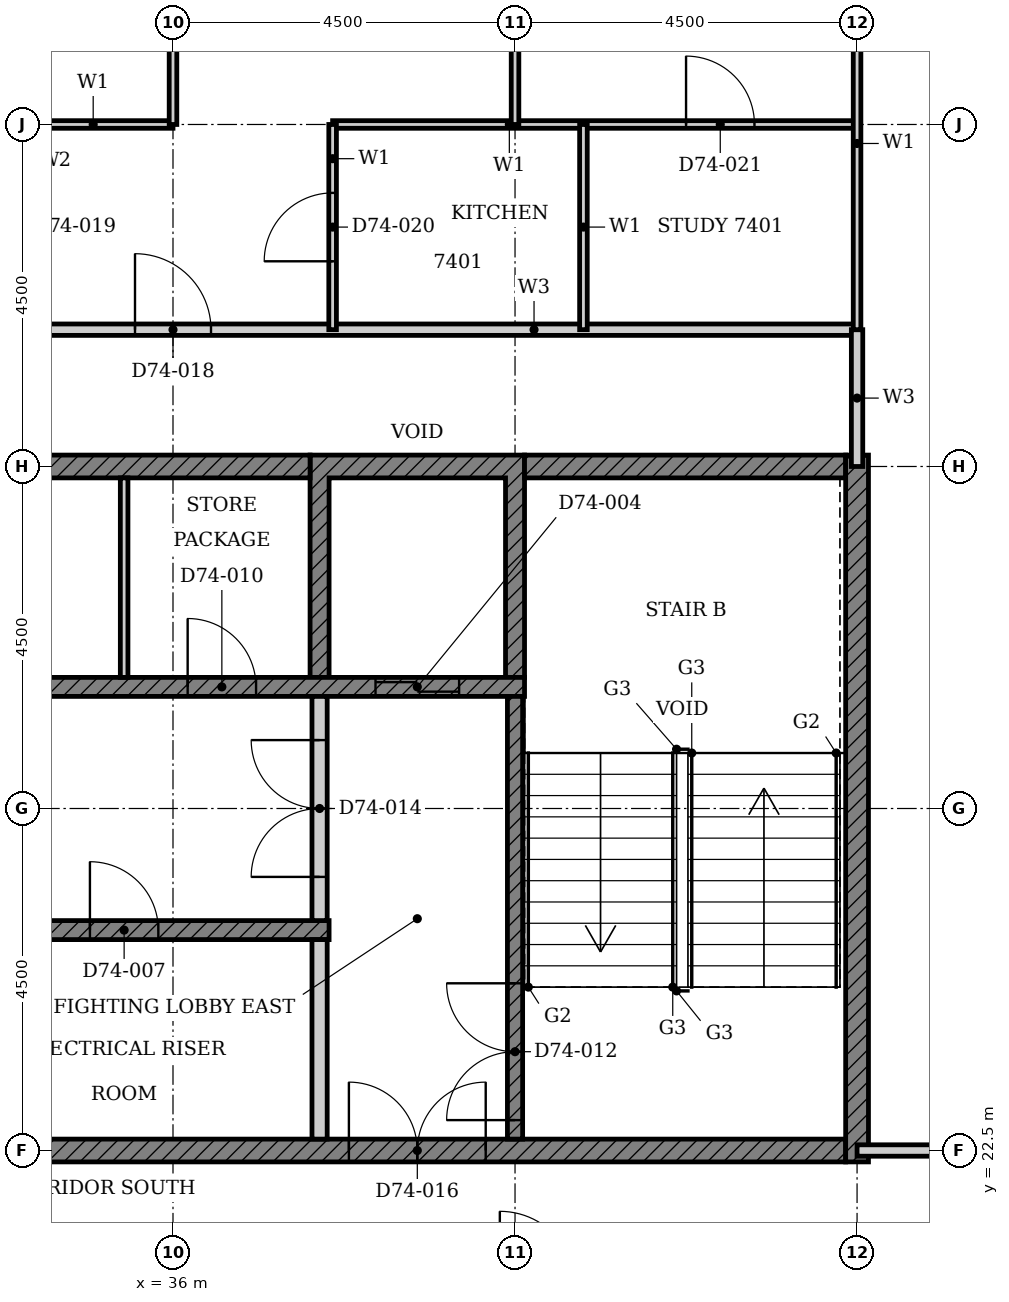
"""IFC4 building model, lengths in metres.
Left out: names, types, materials, properties, quantities, classifications, styles, units other than length and angle.
Written with IfcOpenShell. Run it as: python <this file> out.ifc"""

import sys

from ifc_helpers import new_model, si_unit, direction, frame, frame_2d, origin, place, context, subcontext, project, spatial, polyline, rectangle, outline, extrude, element, fill, save


model = new_model("IFC4")
c1 = context("Model", 3, precision=1e-05, world=origin(), true_north=direction((0.0, 1.0)))
c2 = subcontext(c1, "Body", "Model", "MODEL_VIEW")
j1 = project(units=[si_unit("LENGTHUNIT", "METRE"), si_unit("PLANEANGLEUNIT", "RADIAN")], contexts=[c1])
p1 = place(None, origin())
s1 = spatial("IfcSite", under=j1, at=p1, CompositionType="ELEMENT")
p2 = place(p1, origin())
s2 = spatial("IfcBuilding", under=s1, at=p2, CompositionType="ELEMENT")
p3 = place(p2, frame((0.0, 0.0, 290.8)))
s3 = spatial("IfcBuildingStorey", under=s2, at=p3, CompositionType="ELEMENT", Elevation=290.8)
p4 = place(p3, origin())
e1 = element("IfcWall", 1, at=p4, inside=s3, PredefinedType="SHEAR", context=c2, shape_type="SweptSolid", body=[
    extrude(outline(polyline([(37.803, 28.725), (38.053, 28.725), (38.053, 31.35), (40.375, 31.35), (40.375, 28.725), (40.625, 28.725), (40.625, 31.65), (37.803, 31.65), (37.803, 28.725)])), origin(), (0.0, 0.0, 1.0), 3.4),
])
p5 = place(p3, frame((30.339, 22.5, 0.0), z_axis=(0.0, 0.0, 1.0), x_axis=(1.0, 0.0, 0.0)))
e2 = element("IfcWall", 2, at=p5, inside=s3, PredefinedType="SHEAR", context=c2, shape_type="SweptSolid", body=[
    extrude(rectangle(XDim=14.511, YDim=0.3, at=frame_2d((7.255, 0.0))), origin(), (0.0, 0.0, 1.0), 3.4),
])
p6 = place(p5, frame((7.975, 0.0, 0.0)))
e3 = element("IfcOpeningElement", 3, at=p6, cuts=e2, PredefinedType="OPENING", context=c2, shape_type="SweptSolid", body=[
    extrude(rectangle(XDim=1.8, YDim=2.1, at=frame_2d((0.9, 1.05))), frame((0.0, 0.16, 0.0), z_axis=(0.0, -1.0, 0.0), x_axis=(1.0, 0.0, 0.0)), (0.0, 0.0, 1.0), 0.32),
])
p7 = place(p3, frame((30.339, 31.5, 0.0), z_axis=(0.0, 0.0, 1.0), x_axis=(1.0, 0.0, 0.0)))
e4 = element("IfcWall", 4, at=p7, inside=s3, PredefinedType="SHEAR", context=c2, shape_type="SweptSolid", body=[
    extrude(rectangle(XDim=7.464, YDim=0.3, at=frame_2d((3.732, 0.0))), origin(), (0.0, 0.0, 1.0), 3.4),
])
p8 = place(p3, frame((40.625, 31.5, 0.0), z_axis=(0.0, 0.0, 1.0), x_axis=(1.0, 0.0, 0.0)))
e5 = element("IfcWall", 5, at=p8, inside=s3, PredefinedType="SHEAR", context=c2, shape_type="SweptSolid", body=[
    extrude(rectangle(XDim=4.225, YDim=0.3, at=frame_2d((2.113, 0.0))), origin(), (0.0, 0.0, 1.0), 3.4),
])
p9 = place(p3, frame((45.0, 22.35, 0.0), z_axis=(0.0, 0.0, 1.0), x_axis=(0.0, 1.0, 0.0)))
e6 = element("IfcWall", 6, at=p9, inside=s3, PredefinedType="SHEAR", context=c2, shape_type="SweptSolid", body=[
    extrude(rectangle(XDim=9.3, YDim=0.3, at=frame_2d((4.65, 0.0))), origin(), (0.0, 0.0, 1.0), 3.4),
])
p10 = place(p3, frame((22.375, 25.4, 0.0), z_axis=(0.0, 0.0, 1.0), x_axis=(1.0, 0.0, 0.0)))
e7 = element("IfcWall", 7, at=p10, inside=s3, PredefinedType="SHEAR", context=c2, shape_type="SweptSolid", body=[
    extrude(rectangle(XDim=15.678, YDim=0.25, at=frame_2d((7.839, 0.0))), origin(), (0.0, 0.0, 1.0), 3.4),
])
p11 = place(p10, frame((6.004, 0.0, 0.0)))
e8 = element("IfcOpeningElement", 8, at=p11, cuts=e7, PredefinedType="OPENING", context=c2, shape_type="SweptSolid", body=[
    extrude(rectangle(XDim=1.1, YDim=2.1, at=frame_2d((0.55, 1.05))), frame((0.0, 0.135, 0.0), z_axis=(0.0, -1.0, 0.0), x_axis=(1.0, 0.0, 0.0)), (0.0, 0.0, 1.0), 0.27),
])
p12 = place(p10, frame((0.861, 0.0, 0.0)))
e9 = element("IfcOpeningElement", 9, at=p12, cuts=e7, PredefinedType="OPENING", context=c2, shape_type="SweptSolid", body=[
    extrude(rectangle(XDim=1.1, YDim=2.1, at=frame_2d((0.55, 1.05))), frame((0.0, 0.135, 0.0), z_axis=(0.0, -1.0, 0.0), x_axis=(1.0, 0.0, 0.0)), (0.0, 0.0, 1.0), 0.27),
])
p13 = place(p10, frame((3.532, 0.0, 0.0)))
e10 = element("IfcOpeningElement", 10, at=p13, cuts=e7, PredefinedType="OPENING", context=c2, shape_type="SweptSolid", body=[
    extrude(rectangle(XDim=0.9, YDim=2.1, at=frame_2d((0.45, 1.05))), frame((0.0, 0.135, 0.0), z_axis=(0.0, -1.0, 0.0), x_axis=(1.0, 0.0, 0.0)), (0.0, 0.0, 1.0), 0.27),
])
p14 = place(p10, frame((8.675, 0.0, 0.0)))
e11 = element("IfcOpeningElement", 11, at=p14, cuts=e7, PredefinedType="OPENING", context=c2, shape_type="SweptSolid", body=[
    extrude(rectangle(XDim=0.9, YDim=2.1, at=frame_2d((0.45, 1.05))), frame((0.0, 0.135, 0.0), z_axis=(0.0, -1.0, 0.0), x_axis=(1.0, 0.0, 0.0)), (0.0, 0.0, 1.0), 0.27),
])
p15 = place(p10, frame((12.532, 0.0, 0.0)))
e12 = element("IfcOpeningElement", 12, at=p15, cuts=e7, PredefinedType="OPENING", context=c2, shape_type="SweptSolid", body=[
    extrude(rectangle(XDim=0.9, YDim=2.1, at=frame_2d((0.45, 1.05))), frame((0.0, 0.135, 0.0), z_axis=(0.0, -1.0, 0.0), x_axis=(1.0, 0.0, 0.0)), (0.0, 0.0, 1.0), 0.27),
])
p16 = place(p3, frame((24.947, 28.6, 0.0), z_axis=(0.0, 0.0, 1.0), x_axis=(1.0, 0.0, 0.0)))
e13 = element("IfcWall", 13, at=p16, inside=s3, PredefinedType="SHEAR", context=c2, shape_type="SweptSolid", body=[
    extrude(rectangle(XDim=15.678, YDim=0.25, at=frame_2d((7.839, 0.0))), origin(), (0.0, 0.0, 1.0), 3.4),
])
p17 = place(p16, frame((3.432, 0.0, 0.0)))
e14 = element("IfcOpeningElement", 14, at=p17, cuts=e13, PredefinedType="OPENING", context=c2, shape_type="SweptSolid", body=[
    extrude(rectangle(XDim=1.1, YDim=2.1, at=frame_2d((0.55, 1.05))), frame((0.0, 0.135, 0.0), z_axis=(0.0, -1.0, 0.0), x_axis=(1.0, 0.0, 0.0)), (0.0, 0.0, 1.0), 0.27),
])
p18 = place(p16, frame((13.718, 0.0, 0.0)))
e15 = element("IfcOpeningElement", 15, at=p18, cuts=e13, PredefinedType="OPENING", context=c2, shape_type="SweptSolid", body=[
    extrude(rectangle(XDim=1.1, YDim=2.1, at=frame_2d((0.55, 1.05))), frame((0.0, 0.135, 0.0), z_axis=(0.0, -1.0, 0.0), x_axis=(1.0, 0.0, 0.0)), (0.0, 0.0, 1.0), 0.27),
])
p19 = place(p16, frame((0.961, 0.0, 0.0)))
e16 = element("IfcOpeningElement", 16, at=p19, cuts=e13, PredefinedType="OPENING", context=c2, shape_type="SweptSolid", body=[
    extrude(rectangle(XDim=0.9, YDim=2.1, at=frame_2d((0.45, 1.05))), frame((0.0, 0.135, 0.0), z_axis=(0.0, -1.0, 0.0), x_axis=(1.0, 0.0, 0.0)), (0.0, 0.0, 1.0), 0.27),
])
p20 = place(p16, frame((7.389, 0.0, 0.0)))
e17 = element("IfcOpeningElement", 17, at=p20, cuts=e13, PredefinedType="OPENING", context=c2, shape_type="SweptSolid", body=[
    extrude(rectangle(XDim=0.9, YDim=2.1, at=frame_2d((0.45, 1.05))), frame((0.0, 0.135, 0.0), z_axis=(0.0, -1.0, 0.0), x_axis=(1.0, 0.0, 0.0)), (0.0, 0.0, 1.0), 0.27),
])
p21 = place(p16, frame((11.246, 0.0, 0.0)))
e18 = element("IfcOpeningElement", 18, at=p21, cuts=e13, PredefinedType="OPENING", context=c2, shape_type="SweptSolid", body=[
    extrude(rectangle(XDim=0.9, YDim=2.1, at=frame_2d((0.45, 1.05))), frame((0.0, 0.135, 0.0), z_axis=(0.0, -1.0, 0.0), x_axis=(1.0, 0.0, 0.0)), (0.0, 0.0, 1.0), 0.27),
])
p22 = place(p3, frame((37.928, 22.65, 0.0), z_axis=(0.0, 0.0, 1.0), x_axis=(0.0, 1.0, 0.0)))
e19 = element("IfcWall", 19, at=p22, inside=s3, PredefinedType="PARTITIONING", context=c2, shape_type="SweptSolid", body=[
    extrude(rectangle(XDim=2.625, YDim=0.2, at=frame_2d((1.312, 0.0))), origin(), (0.0, 0.0, 1.0), 3.4),
])
p23 = place(p3, frame((35.357, 28.725, 0.0), z_axis=(0.0, 0.0, 1.0), x_axis=(0.0, 1.0, 0.0)))
e20 = element("IfcWall", 20, at=p23, inside=s3, PredefinedType="PARTITIONING", context=c2, shape_type="SweptSolid", body=[
    extrude(rectangle(XDim=2.625, YDim=0.1, at=frame_2d((1.312, 0.0))), origin(), (0.0, 0.0, 1.0), 3.4),
])
p24 = place(p3, frame((40.5, 22.65, 0.0), z_axis=(0.0, 0.0, 1.0), x_axis=(0.0, 1.0, 0.0)))
e21 = element("IfcWall", 21, at=p24, inside=s3, PredefinedType="SHEAR", context=c2, shape_type="SweptSolid", body=[
    extrude(rectangle(XDim=5.825, YDim=0.2, at=frame_2d((2.913, 0.0))), origin(), (0.0, 0.0, 1.0), 3.4),
])
p25 = place(p24, frame((0.25, 0.0, 0.0)))
e22 = element("IfcOpeningElement", 22, at=p25, cuts=e21, PredefinedType="OPENING", context=c2, shape_type="SweptSolid", body=[
    extrude(rectangle(XDim=1.8, YDim=2.1, at=frame_2d((0.9, 1.05))), frame((0.0, 0.11, 0.0), z_axis=(0.0, -1.0, 0.0), x_axis=(1.0, 0.0, 0.0)), (0.0, 0.0, 1.0), 0.22),
])
p26 = place(p3, frame((37.928, 25.525, 0.0), z_axis=(0.0, 0.0, 1.0), x_axis=(0.0, 1.0, 0.0)))
e23 = element("IfcWall", 23, at=p26, inside=s3, PredefinedType="PARTITIONING", context=c2, shape_type="SweptSolid", body=[
    extrude(rectangle(XDim=2.95, YDim=0.2, at=frame_2d((1.475, 0.0))), origin(), (0.0, 0.0, 1.0), 3.4),
])
p27 = place(p26, frame((0.575, 0.0, 0.0)))
e24 = element("IfcOpeningElement", 24, at=p27, cuts=e23, PredefinedType="OPENING", context=c2, shape_type="SweptSolid", body=[
    extrude(rectangle(XDim=1.8, YDim=2.1, at=frame_2d((0.9, 1.05))), frame((0.0, 0.11, 0.0), z_axis=(0.0, -1.0, 0.0), x_axis=(1.0, 0.0, 0.0)), (0.0, 0.0, 1.0), 0.22),
])
p28 = place(p3, frame((45.0, 22.5, 0.0), z_axis=(0.0, 0.0, 1.0), x_axis=(1.0, 0.0, 0.0)))
e25 = element("IfcWall", 25, at=p28, inside=s3, PredefinedType="PARTITIONING", context=c2, shape_type="SweptSolid", body=[
    extrude(rectangle(XDim=4.74, YDim=0.15, at=frame_2d((2.37, 0.0))), origin(), (0.0, 0.0, 1.0), 3.4),
])
p29 = place(p28, frame((1.75, 0.0, 0.0)))
e26 = element("IfcOpeningElement", 26, at=p29, cuts=e25, PredefinedType="OPENING", context=c2, shape_type="SweptSolid", body=[
    extrude(rectangle(XDim=1.0, YDim=2.1, at=frame_2d((0.5, 1.05))), frame((0.0, 0.085, 0.0), z_axis=(0.0, -1.0, 0.0), x_axis=(1.0, 0.0, 0.0)), (0.0, 0.0, 1.0), 0.17),
])
p30 = place(p3, frame((33.9, 33.3, 0.0), z_axis=(0.0, 0.0, 1.0), x_axis=(1.0, 0.0, 0.0)))
e27 = element("IfcWall", 27, at=p30, inside=s3, PredefinedType="PARTITIONING", context=c2, shape_type="SweptSolid", body=[
    extrude(rectangle(XDim=11.1, YDim=0.15, at=frame_2d((5.55, 0.0))), origin(), (0.0, 0.0, 1.0), 3.4),
])
p31 = place(p30, frame((1.6, 0.0, 0.0)))
e28 = element("IfcOpeningElement", 28, at=p31, cuts=e27, PredefinedType="OPENING", context=c2, shape_type="SweptSolid", body=[
    extrude(rectangle(XDim=1.0, YDim=2.2, at=frame_2d((0.5, 1.1))), frame((0.0, 0.085, 0.0), z_axis=(0.0, -1.0, 0.0), x_axis=(1.0, 0.0, 0.0)), (0.0, 0.0, 1.0), 0.17),
])
p32 = place(p3, frame((45.0, 31.5, 0.0), z_axis=(0.0, 0.0, 1.0), x_axis=(0.0, 1.0, 0.0)))
e29 = element("IfcWall", 29, at=p32, inside=s3, PredefinedType="PARTITIONING", context=c2, shape_type="SweptSolid", body=[
    extrude(rectangle(XDim=1.8, YDim=0.15, at=frame_2d((0.9, 0.0))), origin(), (0.0, 0.0, 1.0), 3.4),
])
p33 = place(p3, frame((33.9, 36.0, 0.0), z_axis=(0.0, 0.0, 1.0), x_axis=(1.0, 0.0, 0.0)))
e30 = element("IfcWall", 30, at=p33, inside=s3, PredefinedType="PARTITIONING", context=c2, shape_type="SweptSolid", body=[
    extrude(rectangle(XDim=2.1, YDim=0.1, at=frame_2d((1.05, 0.0))), origin(), (0.0, 0.0, 1.0), 3.4),
])
p34 = place(p3, frame((38.1, 36.0, 0.0), z_axis=(0.0, 0.0, 1.0), x_axis=(1.0, 0.0, 0.0)))
e31 = element("IfcWall", 31, at=p34, inside=s3, PredefinedType="PARTITIONING", context=c2, shape_type="SweptSolid", body=[
    extrude(rectangle(XDim=6.9, YDim=0.1, at=frame_2d((3.45, 0.0))), origin(), (0.0, 0.0, 1.0), 3.4),
])
p35 = place(p34, frame((4.65, 0.0, 0.0)))
e32 = element("IfcOpeningElement", 32, at=p35, cuts=e31, PredefinedType="OPENING", context=c2, shape_type="SweptSolid", body=[
    extrude(rectangle(XDim=0.9, YDim=2.1, at=frame_2d((0.45, 1.05))), frame((0.0, 0.06, 0.0), z_axis=(0.0, -1.0, 0.0), x_axis=(1.0, 0.0, 0.0)), (0.0, 0.0, 1.0), 0.12),
])
p36 = place(p3, frame((36.0, 36.0, 0.0), z_axis=(0.0, 0.0, 1.0), x_axis=(0.0, 1.0, 0.0)))
e33 = element("IfcWall", 33, at=p36, inside=s3, PredefinedType="PARTITIONING", context=c2, shape_type="SweptSolid", body=[
    extrude(rectangle(XDim=4.69, YDim=0.1, at=frame_2d((2.345, 0.0))), origin(), (0.0, 0.0, 1.0), 3.4),
])
p37 = place(p36, frame((1.8, 0.0, 0.0)))
e34 = element("IfcOpeningElement", 34, at=p37, cuts=e33, PredefinedType="OPENING", context=c2, shape_type="SweptSolid", body=[
    extrude(rectangle(XDim=0.9, YDim=2.1, at=frame_2d((0.45, 1.05))), frame((0.0, 0.06, 0.0), z_axis=(0.0, -1.0, 0.0), x_axis=(1.0, 0.0, 0.0)), (0.0, 0.0, 1.0), 0.12),
])
p38 = place(p3, frame((38.1, 33.3, 0.0), z_axis=(0.0, 0.0, 1.0), x_axis=(0.0, 1.0, 0.0)))
e35 = element("IfcWall", 35, at=p38, inside=s3, PredefinedType="PARTITIONING", context=c2, shape_type="SweptSolid", body=[
    extrude(rectangle(XDim=2.7, YDim=0.1, at=frame_2d((1.35, 0.0))), origin(), (0.0, 0.0, 1.0), 3.4),
])
p39 = place(p38, frame((0.9, 0.0, 0.0)))
e36 = element("IfcOpeningElement", 36, at=p39, cuts=e35, PredefinedType="OPENING", context=c2, shape_type="SweptSolid", body=[
    extrude(rectangle(XDim=0.9, YDim=2.1, at=frame_2d((0.45, 1.05))), frame((0.0, 0.06, 0.0), z_axis=(0.0, -1.0, 0.0), x_axis=(1.0, 0.0, 0.0)), (0.0, 0.0, 1.0), 0.12),
])
p40 = place(p3, frame((40.5, 36.0, 0.0), z_axis=(0.0, 0.0, 1.0), x_axis=(0.0, 1.0, 0.0)))
e37 = element("IfcWall", 37, at=p40, inside=s3, PredefinedType="PARTITIONING", context=c2, shape_type="SweptSolid", body=[
    extrude(rectangle(XDim=4.74, YDim=0.1, at=frame_2d((2.37, 0.0))), origin(), (0.0, 0.0, 1.0), 3.4),
])
p41 = place(p40, frame((1.8, 0.0, 0.0)))
e38 = element("IfcOpeningElement", 38, at=p41, cuts=e37, PredefinedType="OPENING", context=c2, shape_type="SweptSolid", body=[
    extrude(rectangle(XDim=0.9, YDim=2.1, at=frame_2d((0.45, 1.05))), frame((0.0, 0.06, 0.0), z_axis=(0.0, -1.0, 0.0), x_axis=(1.0, 0.0, 0.0)), (0.0, 0.0, 1.0), 0.12),
])
p42 = place(p3, frame((41.4, 33.3, 0.0), z_axis=(0.0, 0.0, 1.0), x_axis=(0.0, 1.0, 0.0)))
e39 = element("IfcWall", 39, at=p42, inside=s3, PredefinedType="PARTITIONING", context=c2, shape_type="SweptSolid", body=[
    extrude(rectangle(XDim=2.7, YDim=0.1, at=frame_2d((1.35, 0.0))), origin(), (0.0, 0.0, 1.0), 3.4),
])
p43 = place(p3, frame((45.0, 33.3, 0.0), z_axis=(0.0, 0.0, 1.0), x_axis=(0.0, 1.0, 0.0)))
e40 = element("IfcWall", 40, at=p43, inside=s3, PredefinedType="PARTITIONING", context=c2, shape_type="SweptSolid", body=[
    extrude(rectangle(XDim=4.9, YDim=0.1, at=frame_2d((2.45, 0.0))), origin(), (0.0, 0.0, 1.0), 3.4),
])
p44 = place(p18, origin())
e41 = element("IfcDoor", 41, at=p44, inside=s3, OperationType="DOUBLE_DOOR_SLIDING", PredefinedType="DOOR", context=c2, shape_type="SweptSolid", body=[
    extrude(rectangle(XDim=1.1, YDim=2.1, at=frame_2d((0.55, 1.05))), frame((0.0, 0.025, 0.0), z_axis=(0.0, -1.0, 0.0), x_axis=(1.0, 0.0, 0.0)), (0.0, 0.0, 1.0), 0.05),
])
fill(e15, e41)
p45 = place(p15, origin())
e42 = element("IfcDoor", 42, at=p45, inside=s3, OperationType="SINGLE_SWING_LEFT", PredefinedType="DOOR", context=c2, shape_type="SweptSolid", body=[
    extrude(rectangle(XDim=0.9, YDim=2.1, at=frame_2d((0.45, 1.05))), frame((0.0, 0.025, 0.0), z_axis=(0.0, -1.0, 0.0), x_axis=(1.0, 0.0, 0.0)), (0.0, 0.0, 1.0), 0.05),
])
fill(e12, e42)
p46 = place(p21, origin())
e43 = element("IfcDoor", 43, at=p46, inside=s3, OperationType="SINGLE_SWING_LEFT", PredefinedType="DOOR", context=c2, shape_type="SweptSolid", body=[
    extrude(rectangle(XDim=0.9, YDim=2.1, at=frame_2d((0.45, 1.05))), frame((0.0, 0.025, 0.0), z_axis=(0.0, -1.0, 0.0), x_axis=(1.0, 0.0, 0.0)), (0.0, 0.0, 1.0), 0.05),
])
fill(e18, e43)
p47 = place(p25, origin())
e44 = element("IfcDoor", 44, at=p47, inside=s3, OperationType="DOUBLE_DOOR_SINGLE_SWING", PredefinedType="DOOR", context=c2, shape_type="SweptSolid", body=[
    extrude(rectangle(XDim=1.8, YDim=2.1, at=frame_2d((0.9, 1.05))), frame((0.0, 0.025, 0.0), z_axis=(0.0, -1.0, 0.0), x_axis=(1.0, 0.0, 0.0)), (0.0, 0.0, 1.0), 0.05),
])
fill(e22, e44)
p48 = place(p27, origin())
e45 = element("IfcDoor", 45, at=p48, inside=s3, OperationType="DOUBLE_DOOR_SINGLE_SWING", PredefinedType="DOOR", context=c2, shape_type="SweptSolid", body=[
    extrude(rectangle(XDim=1.8, YDim=2.1, at=frame_2d((0.9, 1.05))), frame((0.0, 0.025, 0.0), z_axis=(0.0, -1.0, 0.0), x_axis=(1.0, 0.0, 0.0)), (0.0, 0.0, 1.0), 0.05),
])
fill(e24, e45)
p49 = place(p6, origin())
e46 = element("IfcDoor", 46, at=p49, inside=s3, OperationType="DOUBLE_DOOR_SINGLE_SWING", PredefinedType="DOOR", context=c2, shape_type="SweptSolid", body=[
    extrude(rectangle(XDim=1.8, YDim=2.1, at=frame_2d((0.9, 1.05))), frame((0.0, 0.025, 0.0), z_axis=(0.0, -1.0, 0.0), x_axis=(1.0, 0.0, 0.0)), (0.0, 0.0, 1.0), 0.05),
])
fill(e3, e46)
p50 = place(p31, origin())
e47 = element("IfcDoor", 47, at=p50, inside=s3, OperationType="SINGLE_SWING_RIGHT", PredefinedType="DOOR", context=c2, shape_type="SweptSolid", body=[
    extrude(rectangle(XDim=1.0, YDim=2.2, at=frame_2d((0.5, 1.1))), frame((0.0, 0.025, 0.0), z_axis=(0.0, -1.0, 0.0), x_axis=(1.0, 0.0, 0.0)), (0.0, 0.0, 1.0), 0.05),
])
fill(e28, e47)
p51 = place(p39, origin())
e48 = element("IfcDoor", 48, at=p51, inside=s3, OperationType="SINGLE_SWING_RIGHT", PredefinedType="DOOR", context=c2, shape_type="SweptSolid", body=[
    extrude(rectangle(XDim=0.9, YDim=2.1, at=frame_2d((0.45, 1.05))), frame((0.0, 0.025, 0.0), z_axis=(0.0, -1.0, 0.0), x_axis=(1.0, 0.0, 0.0)), (0.0, 0.0, 1.0), 0.05),
])
fill(e36, e48)
p52 = place(p35, origin())
e49 = element("IfcDoor", 49, at=p52, inside=s3, OperationType="SINGLE_SWING_LEFT", PredefinedType="DOOR", context=c2, shape_type="SweptSolid", body=[
    extrude(rectangle(XDim=0.9, YDim=2.1, at=frame_2d((0.45, 1.05))), frame((0.0, 0.025, 0.0), z_axis=(0.0, -1.0, 0.0), x_axis=(1.0, 0.0, 0.0)), (0.0, 0.0, 1.0), 0.05),
])
fill(e32, e49)
save(model, sys.argv[1])
